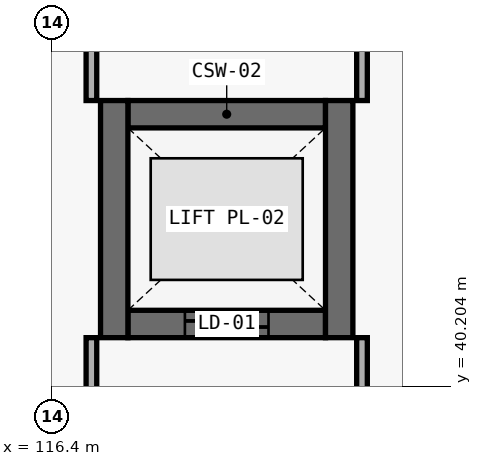
"""IFC4 building model, lengths in metres.
Left out: names, types, materials, properties, quantities, classifications, styles, units other than length and angle.
Written with IfcOpenShell. Run it as: python <this file> out.ifc"""

import sys

from ifc_helpers import new_model, si_unit, direction, frame, frame_2d, origin, place, context, subcontext, project, spatial, rectangle, extrude, element, fill, save


model = new_model("IFC4")
c1 = context("Model", 3, precision=1e-05, world=origin(), true_north=direction((0.0, 1.0)))
c2 = subcontext(c1, "Body", "Model", "MODEL_VIEW")
j1 = project(units=[si_unit("LENGTHUNIT", "METRE"), si_unit("PLANEANGLEUNIT", "RADIAN")], contexts=[c1])
p1 = place(None, origin())
s1 = spatial("IfcSite", under=j1, at=p1, CompositionType="ELEMENT")
p2 = place(p1, origin())
s2 = spatial("IfcBuilding", under=s1, at=p2, CompositionType="ELEMENT")
p3 = place(p2, frame((0.0, 0.0, 17.1)))
s3 = spatial("IfcBuildingStorey", under=s2, at=p3, CompositionType="ELEMENT", Elevation=17.1)
p4 = place(p3, frame((117.4, 43.78, 0.0), z_axis=(0.0, 0.0, 1.0), x_axis=(1.0, 0.0, 0.0)))
e1 = element("IfcWall", 1, at=p4, inside=s3, PredefinedType="SHEAR", context=c2, shape_type="SweptSolid", body=[
    extrude(rectangle(XDim=2.6, YDim=0.36, at=frame_2d((1.3, 0.0))), origin(), (0.0, 0.0, 1.0), 3.94),
])
p5 = place(p3, frame((117.4, 41.02, 0.0), z_axis=(0.0, 0.0, 1.0), x_axis=(1.0, 0.0, 0.0)))
e2 = element("IfcWall", 2, at=p5, inside=s3, PredefinedType="SHEAR", context=c2, shape_type="SweptSolid", body=[
    extrude(rectangle(XDim=2.6, YDim=0.36, at=frame_2d((1.3, 0.0))), origin(), (0.0, 0.0, 1.0), 3.94),
])
p6 = place(p5, frame((0.75, 0.0, 0.0)))
e3 = element("IfcOpeningElement", 3, at=p6, cuts=e2, PredefinedType="OPENING", context=c2, shape_type="SweptSolid", body=[
    extrude(rectangle(XDim=1.1, YDim=2.15, at=frame_2d((0.55, 1.075))), frame((0.0, 0.195, 0.0), z_axis=(0.0, -1.0, 0.0), x_axis=(1.0, 0.0, 0.0)), (0.0, 0.0, 1.0), 0.39),
])
for number, where, z_axis, x_axis in (
    (4, (117.22, 40.84, 0.0), (0.0, 0.0, 1.0), (0.0, 1.0, 0.0)),
    (5, (120.18, 40.84, 0.0), (0.0, 0.0, 1.0), (0.0, 1.0, 0.0)),
):
    element("IfcWall", number, at=place(p3, frame(where, z_axis=z_axis, x_axis=x_axis)), inside=s3, PredefinedType="SHEAR", context=c2, shape_type="SweptSolid", body=[
        extrude(rectangle(XDim=3.12, YDim=0.36, at=frame_2d((1.56, 0.0))), origin(), (0.0, 0.0, 1.0), 3.94),
    ])
p7 = place(p3, frame((116.92, 39.975, 0.0), z_axis=(0.0, 0.0, 1.0), x_axis=(0.0, 1.0, 0.0)))
e6 = element("IfcWall", 6, at=p7, inside=s3, PredefinedType="PARTITIONING", context=c2, shape_type="SweptSolid", body=[
    extrude(rectangle(XDim=0.865, YDim=0.14, at=frame_2d((0.433, 0.0))), origin(), (0.0, 0.0, 1.0), 2.82),
])
p8 = place(p3, frame((116.92, 43.96, 0.0), z_axis=(0.0, 0.0, 1.0), x_axis=(0.0, 1.0, 0.0)))
e7 = element("IfcWall", 7, at=p8, inside=s3, PredefinedType="PARTITIONING", context=c2, shape_type="SweptSolid", body=[
    extrude(rectangle(XDim=1.85, YDim=0.14, at=frame_2d((0.925, 0.0))), origin(), (0.0, 0.0, 1.0), 2.82),
])
p9 = place(p3, frame((120.48, 20.15, 0.0), z_axis=(0.0, 0.0, 1.0), x_axis=(0.0, 1.0, 0.0)))
e8 = element("IfcWall", 8, at=p9, inside=s3, PredefinedType="PARTITIONING", context=c2, shape_type="SweptSolid", body=[
    extrude(rectangle(XDim=20.69, YDim=0.14, at=frame_2d((10.345, 0.0))), origin(), (0.0, 0.0, 1.0), 2.82),
])
p10 = place(p3, frame((120.48, 43.96, 0.0), z_axis=(0.0, 0.0, 1.0), x_axis=(0.0, 1.0, 0.0)))
e9 = element("IfcWall", 9, at=p10, inside=s3, PredefinedType="PARTITIONING", context=c2, shape_type="SweptSolid", body=[
    extrude(rectangle(XDim=1.85, YDim=0.14, at=frame_2d((0.925, 0.0))), origin(), (0.0, 0.0, 1.0), 2.82),
])
p11 = place(p6, origin())
e10 = element("IfcDoor", 10, at=p11, inside=s3, OperationType="DOUBLE_DOOR_SLIDING", PredefinedType="DOOR", context=c2, shape_type="SweptSolid", body=[
    extrude(rectangle(XDim=1.1, YDim=2.15, at=frame_2d((0.55, 1.075))), frame((0.0, 0.025, 0.0), z_axis=(0.0, -1.0, 0.0), x_axis=(1.0, 0.0, 0.0)), (0.0, 0.0, 1.0), 0.05),
])
fill(e3, e10)
save(model, sys.argv[1])
